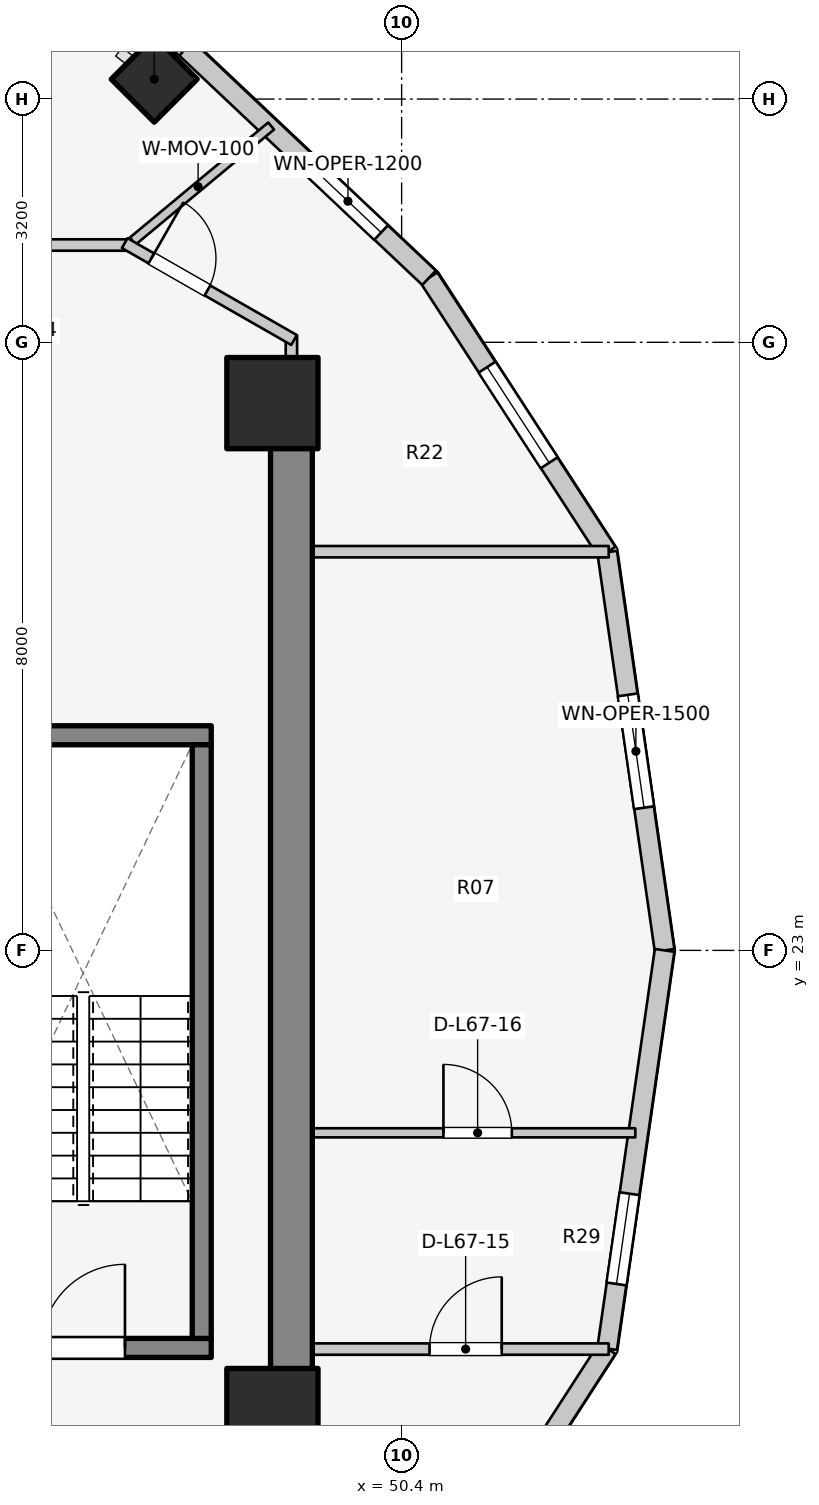
"""IFC4 building model, lengths in metres.
Left out: names, types, materials, properties, quantities, classifications, styles, units other than length and angle.
Written with IfcOpenShell. Run it as: python <this file> out.ifc"""

import sys

from ifc_helpers import new_model, si_unit, direction, frame, frame_2d, origin, origin_2d, place, context, subcontext, project, spatial, rectangle, extrude, element, fill, save


model = new_model("IFC4")
c1 = context("Model", 3, precision=1e-05, world=origin(), true_north=direction((0.0, 1.0)))
c2 = subcontext(c1, "Body", "Model", "MODEL_VIEW")
j1 = project(units=[si_unit("LENGTHUNIT", "METRE"), si_unit("PLANEANGLEUNIT", "RADIAN")], contexts=[c1])
p1 = place(None, origin())
s1 = spatial("IfcSite", under=j1, at=p1, CompositionType="ELEMENT")
p2 = place(p1, origin())
s2 = spatial("IfcBuilding", under=s1, at=p2, CompositionType="ELEMENT")
p3 = place(p2, frame((0.0, 0.0, 220.2)))
s3 = spatial("IfcBuildingStorey", under=s2, at=p3, CompositionType="ELEMENT", Elevation=220.2)
p4 = place(p3, frame((48.95, 17.05, 0.0), z_axis=(0.0, 0.0, 1.0), x_axis=(0.0, 1.0, 0.0)))
e1 = element("IfcWall", 1, at=p4, inside=s3, PredefinedType="SHEAR", context=c2, shape_type="SweptSolid", body=[
    extrude(rectangle(XDim=12.8, YDim=0.55, at=frame_2d((6.4, 0.0))), origin(), (0.0, 0.0, 1.0), 3.1),
])
p5 = place(p3, frame((44.525, 17.77, 0.0), z_axis=(0.0, 0.0, 1.0), x_axis=(1.0, 0.0, 0.0)))
e2 = element("IfcWall", 2, at=p5, inside=s3, PredefinedType="SOLIDWALL", context=c2, shape_type="SweptSolid", body=[
    extrude(rectangle(XDim=3.37, YDim=0.25, at=frame_2d((1.685, 0.0))), origin(), (0.0, 0.0, 1.0), 3.1),
])
p6 = place(p5, frame((1.135, 0.0, 0.0)))
e3 = element("IfcOpeningElement", 3, at=p6, cuts=e2, PredefinedType="OPENING", context=c2, shape_type="SweptSolid", body=[
    extrude(rectangle(XDim=1.1, YDim=2.1, at=frame_2d((0.55, 1.05))), frame((0.0, 0.135, 0.0), z_axis=(0.0, -1.0, 0.0), x_axis=(1.0, 0.0, 0.0)), (0.0, 0.0, 1.0), 0.27),
])
p7 = place(p3, frame((44.525, 25.83, 0.0), z_axis=(0.0, 0.0, 1.0), x_axis=(1.0, 0.0, 0.0)))
e4 = element("IfcWall", 4, at=p7, inside=s3, PredefinedType="SOLIDWALL", context=c2, shape_type="SweptSolid", body=[
    extrude(rectangle(XDim=3.37, YDim=0.25, at=frame_2d((1.685, 0.0))), origin(), (0.0, 0.0, 1.0), 3.1),
])
p8 = place(p3, frame((47.77, 17.895, 0.0), z_axis=(0.0, 0.0, 1.0), x_axis=(0.0, 1.0, 0.0)))
e5 = element("IfcWall", 5, at=p8, inside=s3, PredefinedType="SOLIDWALL", context=c2, shape_type="SweptSolid", body=[
    extrude(rectangle(XDim=7.81, YDim=0.25, at=frame_2d((3.905, 0.0))), origin(), (0.0, 0.0, 1.0), 3.1),
])
for number, where, z_axis, x_axis in (
    (6, (48.7, 16.9, 0.0), (0.0, 0.0, 1.0), (1.0, 0.0, 0.0)),
    (7, (48.7, 30.2, 0.0), (0.0, 0.0, 1.0), (1.0, 0.0, 0.0)),
):
    element("IfcColumn", number, at=place(p3, frame(where, z_axis=z_axis, x_axis=x_axis)), inside=s3, PredefinedType="COLUMN", context=c2, shape_type="SweptSolid", body=[
        extrude(rectangle(XDim=1.2, YDim=1.2, at=origin_2d()), origin(), (0.0, 0.0, 1.0), 3.1),
    ])
p9 = place(p3, frame((47.145, 34.462, 0.0), z_axis=(0.0, 0.0, 1.0), x_axis=(0.707106781187, 0.707106781187, 0.0)))
e8 = element("IfcColumn", 8, at=p9, inside=s3, PredefinedType="COLUMN", context=c2, shape_type="SweptSolid", body=[
    extrude(rectangle(XDim=0.8, YDim=0.8, at=origin_2d()), origin(), (0.0, 0.0, 1.0), 3.1),
])
p10 = place(p3, frame((53.86, 23.0, 0.0), z_axis=(0.0, 0.0, 1.0), x_axis=(-0.142712754019, 0.989764148593, 0.0)))
e9 = element("IfcWall", 9, at=p10, inside=s3, PredefinedType="STANDARD", context=c2, shape_type="SweptSolid", body=[
    extrude(rectangle(XDim=5.293, YDim=0.26, at=frame_2d((2.646, 0.0))), origin(), (0.0, 0.0, 1.0), 2.85),
])
p11 = place(p10, frame((1.896, 0.0, 0.75)))
e10 = element("IfcOpeningElement", 10, at=p11, cuts=e9, PredefinedType="OPENING", context=c2, shape_type="SweptSolid", body=[
    extrude(rectangle(XDim=1.5, YDim=1.6, at=frame_2d((0.75, 0.8))), frame((0.0, 0.14, 0.0), z_axis=(0.0, -1.0, 0.0), x_axis=(1.0, 0.0, 0.0)), (0.0, 0.0, 1.0), 0.28),
])
p12 = place(p3, frame((53.105, 28.239, 0.0), z_axis=(0.0, 0.0, 1.0), x_axis=(-0.544475908819, 0.838776480784, 0.0)))
e11 = element("IfcWall", 11, at=p12, inside=s3, PredefinedType="STANDARD", context=c2, shape_type="SweptSolid", body=[
    extrude(rectangle(XDim=4.305, YDim=0.26, at=frame_2d((2.152, 0.0))), origin(), (0.0, 0.0, 1.0), 2.85),
])
p13 = place(p12, frame((1.402, 0.0, 0.75)))
e12 = element("IfcOpeningElement", 12, at=p13, cuts=e11, PredefinedType="OPENING", context=c2, shape_type="SweptSolid", body=[
    extrude(rectangle(XDim=1.5, YDim=1.6, at=frame_2d((0.75, 0.8))), frame((0.0, 0.14, 0.0), z_axis=(0.0, -1.0, 0.0), x_axis=(1.0, 0.0, 0.0)), (0.0, 0.0, 1.0), 0.28),
])
p14 = place(p3, frame((50.761, 31.849, 0.0), z_axis=(0.0, 0.0, 1.0), x_axis=(-0.72731899451, 0.686299555752, 0.0)))
e13 = element("IfcWall", 13, at=p14, inside=s3, PredefinedType="STANDARD", context=c2, shape_type="SweptSolid", body=[
    extrude(rectangle(XDim=4.404, YDim=0.26, at=frame_2d((2.202, 0.0))), origin(), (0.0, 0.0, 1.0), 2.85),
])
p15 = place(p14, frame((0.867, 0.0, 0.75)))
e14 = element("IfcOpeningElement", 14, at=p15, cuts=e13, PredefinedType="OPENING", context=c2, shape_type="SweptSolid", body=[
    extrude(rectangle(XDim=1.2, YDim=1.5, at=frame_2d((0.6, 0.75))), frame((0.0, 0.14, 0.0), z_axis=(0.0, -1.0, 0.0), x_axis=(1.0, 0.0, 0.0)), (0.0, 0.0, 1.0), 0.28),
])
p16 = place(p3, frame((47.558, 34.872, 0.0), z_axis=(0.0, 0.0, 1.0), x_axis=(-0.790126214723, 0.612944177563, 0.0)))
e15 = element("IfcWall", 15, at=p16, inside=s3, PredefinedType="STANDARD", context=c2, shape_type="SweptSolid", body=[
    extrude(rectangle(XDim=4.667, YDim=0.26, at=frame_2d((2.333, 0.0))), origin(), (0.0, 0.0, 1.0), 2.85),
])
p17 = place(p3, frame((50.761, 14.133, 0.0), z_axis=(0.0, 0.0, 1.0), x_axis=(0.542641766008, 0.839964233634, 0.0)))
e16 = element("IfcWall", 16, at=p17, inside=s3, PredefinedType="STANDARD", context=c2, shape_type="SweptSolid", body=[
    extrude(rectangle(XDim=4.319, YDim=0.26, at=frame_2d((2.16, 0.0))), origin(), (0.0, 0.0, 1.0), 2.85),
])
p18 = place(p17, frame((1.41, 0.0, 0.75)))
e17 = element("IfcOpeningElement", 17, at=p18, cuts=e16, PredefinedType="OPENING", context=c2, shape_type="SweptSolid", body=[
    extrude(rectangle(XDim=1.5, YDim=1.6, at=frame_2d((0.75, 0.8))), frame((0.0, 0.14, 0.0), z_axis=(0.0, -1.0, 0.0), x_axis=(1.0, 0.0, 0.0)), (0.0, 0.0, 1.0), 0.28),
])
p19 = place(p3, frame((53.105, 17.761, 0.0), z_axis=(0.0, 0.0, 1.0), x_axis=(0.142712754019, 0.989764148593, 0.0)))
e18 = element("IfcWall", 18, at=p19, inside=s3, PredefinedType="STANDARD", context=c2, shape_type="SweptSolid", body=[
    extrude(rectangle(XDim=5.293, YDim=0.26, at=frame_2d((2.646, 0.0))), origin(), (0.0, 0.0, 1.0), 2.85),
])
p20 = place(p19, frame((0.859, 0.0, 0.75)))
e19 = element("IfcOpeningElement", 19, at=p20, cuts=e18, PredefinedType="OPENING", context=c2, shape_type="SweptSolid", body=[
    extrude(rectangle(XDim=1.2, YDim=1.5, at=frame_2d((0.6, 0.75))), frame((0.0, 0.14, 0.0), z_axis=(0.0, -1.0, 0.0), x_axis=(1.0, 0.0, 0.0)), (0.0, 0.0, 1.0), 0.28),
])
p21 = place(p3, frame((48.95, 17.755, 0.0), z_axis=(0.0, 0.0, 1.0), x_axis=(1.0, 0.0, 0.0)))
e20 = element("IfcWall", 20, at=p21, inside=s3, PredefinedType="PARTITIONING", context=c2, shape_type="SweptSolid", body=[
    extrude(rectangle(XDim=4.175, YDim=0.15, at=frame_2d((2.087, 0.0))), origin(), (0.0, 0.0, 1.0), 2.855),
])
p22 = place(p21, frame((1.817, 0.0, 0.0)))
e21 = element("IfcOpeningElement", 21, at=p22, cuts=e20, PredefinedType="OPENING", context=c2, shape_type="SweptSolid", body=[
    extrude(rectangle(XDim=0.95, YDim=2.1, at=frame_2d((0.475, 1.05))), frame((0.0, 0.085, 0.0), z_axis=(0.0, -1.0, 0.0), x_axis=(1.0, 0.0, 0.0)), (0.0, 0.0, 1.0), 0.17),
])
p23 = place(p3, frame((48.95, 28.245, 0.0), z_axis=(0.0, 0.0, 1.0), x_axis=(1.0, 0.0, 0.0)))
e22 = element("IfcWall", 22, at=p23, inside=s3, PredefinedType="PARTITIONING", context=c2, shape_type="SweptSolid", body=[
    extrude(rectangle(XDim=4.175, YDim=0.15, at=frame_2d((2.087, 0.0))), origin(), (0.0, 0.0, 1.0), 2.855),
])
p24 = place(p3, frame((48.95, 20.6, 0.0), z_axis=(0.0, 0.0, 1.0), x_axis=(1.0, 0.0, 0.0)))
e23 = element("IfcWall", 23, at=p24, inside=s3, PredefinedType="MOVABLE", context=c2, shape_type="SweptSolid", body=[
    extrude(rectangle(XDim=4.524, YDim=0.12, at=frame_2d((2.262, 0.0))), origin(), (0.0, 0.0, 1.0), 2.855),
])
p25 = place(p24, frame((2.0, 0.0, 0.0)))
e24 = element("IfcOpeningElement", 24, at=p25, cuts=e23, PredefinedType="OPENING", context=c2, shape_type="SweptSolid", body=[
    extrude(rectangle(XDim=0.9, YDim=2.1, at=frame_2d((0.45, 1.05))), frame((0.0, 0.07, 0.0), z_axis=(0.0, -1.0, 0.0), x_axis=(1.0, 0.0, 0.0)), (0.0, 0.0, 1.0), 0.14),
])
p26 = place(p3, frame((48.95, 29.8, 0.0), z_axis=(0.0, 0.0, 1.0), x_axis=(0.0, 1.0, 0.0)))
e25 = element("IfcWall", 25, at=p26, inside=s3, PredefinedType="PARTITIONING", context=c2, shape_type="SweptSolid", body=[
    extrude(rectangle(XDim=1.29, YDim=0.15, at=frame_2d((0.645, 0.0))), origin(), (0.0, 0.0, 1.0), 2.855),
])
p27 = place(p3, frame((46.762, 32.248, 0.0), z_axis=(0.0, 0.0, 1.0), x_axis=(0.76890954941, 0.639357571962, 0.0)))
e26 = element("IfcWall", 26, at=p27, inside=s3, PredefinedType="MOVABLE", context=c2, shape_type="SweptSolid", body=[
    extrude(rectangle(XDim=2.499, YDim=0.12, at=frame_2d((1.25, 0.0))), origin(), (0.0, 0.0, 1.0), 2.22),
])
p28 = place(p3, frame((39.33, 32.28, 0.0), z_axis=(0.0, 0.0, 1.0), x_axis=(1.0, 0.0, 0.0)))
e27 = element("IfcWall", 27, at=p28, inside=s3, PredefinedType="PARTITIONING", context=c2, shape_type="SweptSolid", body=[
    extrude(rectangle(XDim=7.52, YDim=0.15, at=frame_2d((3.76, 0.0))), origin(), (0.0, 0.0, 1.0), 2.376),
])
p29 = place(p28, frame((5.22, 0.0, 0.0)))
e28 = element("IfcOpeningElement", 28, at=p29, cuts=e27, PredefinedType="OPENING", context=c2, shape_type="SweptSolid", body=[
    extrude(rectangle(XDim=0.9, YDim=2.1, at=frame_2d((0.45, 1.05))), frame((0.0, 0.085, 0.0), z_axis=(0.0, -1.0, 0.0), x_axis=(1.0, 0.0, 0.0)), (0.0, 0.0, 1.0), 0.17),
])
p30 = place(p3, frame((46.757, 32.305, 0.0), z_axis=(0.0, 0.0, 1.0), x_axis=(0.867991349648, -0.496579315857, 0.0)))
e29 = element("IfcWall", 29, at=p30, inside=s3, PredefinedType="PARTITIONING", context=c2, shape_type="SweptSolid", body=[
    extrude(rectangle(XDim=2.567, YDim=0.15, at=frame_2d((1.283, 0.0))), origin(), (0.0, 0.0, 1.0), 2.22),
])
p31 = place(p30, frame((0.404, 0.0, 0.0)))
e30 = element("IfcOpeningElement", 30, at=p31, cuts=e29, PredefinedType="OPENING", context=c2, shape_type="SweptSolid", body=[
    extrude(rectangle(XDim=0.85, YDim=2.05, at=frame_2d((0.425, 1.025))), frame((0.0, 0.085, 0.0), z_axis=(0.0, -1.0, 0.0), x_axis=(1.0, 0.0, 0.0)), (0.0, 0.0, 1.0), 0.17),
])
p32 = place(p11, origin())
e31 = element("IfcWindow", 31, at=p32, inside=s3, PartitioningType="SINGLE_PANEL", PredefinedType="WINDOW", context=c2, shape_type="SweptSolid", body=[
    extrude(rectangle(XDim=1.5, YDim=1.6, at=frame_2d((0.75, 0.8))), frame((0.0, 0.03, 0.0), z_axis=(0.0, -1.0, 0.0), x_axis=(1.0, 0.0, 0.0)), (0.0, 0.0, 1.0), 0.06),
])
fill(e10, e31)
p33 = place(p13, origin())
e32 = element("IfcWindow", 32, at=p33, inside=s3, PartitioningType="SINGLE_PANEL", PredefinedType="WINDOW", context=c2, shape_type="SweptSolid", body=[
    extrude(rectangle(XDim=1.5, YDim=1.6, at=frame_2d((0.75, 0.8))), frame((0.0, 0.03, 0.0), z_axis=(0.0, -1.0, 0.0), x_axis=(1.0, 0.0, 0.0)), (0.0, 0.0, 1.0), 0.06),
])
fill(e12, e32)
p34 = place(p15, origin())
e33 = element("IfcWindow", 33, at=p34, inside=s3, PartitioningType="SINGLE_PANEL", PredefinedType="WINDOW", context=c2, shape_type="SweptSolid", body=[
    extrude(rectangle(XDim=1.2, YDim=1.5, at=frame_2d((0.6, 0.75))), frame((0.0, 0.03, 0.0), z_axis=(0.0, -1.0, 0.0), x_axis=(1.0, 0.0, 0.0)), (0.0, 0.0, 1.0), 0.06),
])
fill(e14, e33)
p35 = place(p20, origin())
e34 = element("IfcWindow", 34, at=p35, inside=s3, PartitioningType="SINGLE_PANEL", PredefinedType="WINDOW", context=c2, shape_type="SweptSolid", body=[
    extrude(rectangle(XDim=1.2, YDim=1.5, at=frame_2d((0.6, 0.75))), frame((0.0, 0.03, 0.0), z_axis=(0.0, -1.0, 0.0), x_axis=(1.0, 0.0, 0.0)), (0.0, 0.0, 1.0), 0.06),
])
fill(e19, e34)
p36 = place(p6, origin())
e35 = element("IfcDoor", 35, at=p36, inside=s3, OperationType="SINGLE_SWING_RIGHT", PredefinedType="DOOR", context=c2, shape_type="SweptSolid", body=[
    extrude(rectangle(XDim=1.1, YDim=2.1, at=frame_2d((0.55, 1.05))), frame((0.0, 0.025, 0.0), z_axis=(0.0, -1.0, 0.0), x_axis=(1.0, 0.0, 0.0)), (0.0, 0.0, 1.0), 0.05),
])
fill(e3, e35)
p37 = place(p22, origin())
e36 = element("IfcDoor", 36, at=p37, inside=s3, OperationType="SINGLE_SWING_RIGHT", PredefinedType="DOOR", context=c2, shape_type="SweptSolid", body=[
    extrude(rectangle(XDim=0.95, YDim=2.1, at=frame_2d((0.475, 1.05))), frame((0.0, 0.025, 0.0), z_axis=(0.0, -1.0, 0.0), x_axis=(1.0, 0.0, 0.0)), (0.0, 0.0, 1.0), 0.05),
])
fill(e21, e36)
p38 = place(p25, origin())
e37 = element("IfcDoor", 37, at=p38, inside=s3, OperationType="SINGLE_SWING_LEFT", PredefinedType="DOOR", context=c2, shape_type="SweptSolid", body=[
    extrude(rectangle(XDim=0.9, YDim=2.1, at=frame_2d((0.45, 1.05))), frame((0.0, 0.025, 0.0), z_axis=(0.0, -1.0, 0.0), x_axis=(1.0, 0.0, 0.0)), (0.0, 0.0, 1.0), 0.05),
])
fill(e24, e37)
p39 = place(p31, origin())
e38 = element("IfcDoor", 38, at=p39, inside=s3, OperationType="SINGLE_SWING_LEFT", PredefinedType="DOOR", context=c2, shape_type="SweptSolid", body=[
    extrude(rectangle(XDim=0.85, YDim=2.05, at=frame_2d((0.425, 1.025))), frame((0.0, 0.025, 0.0), z_axis=(0.0, -1.0, 0.0), x_axis=(1.0, 0.0, 0.0)), (0.0, 0.0, 1.0), 0.05),
])
fill(e30, e38)
save(model, sys.argv[1])
